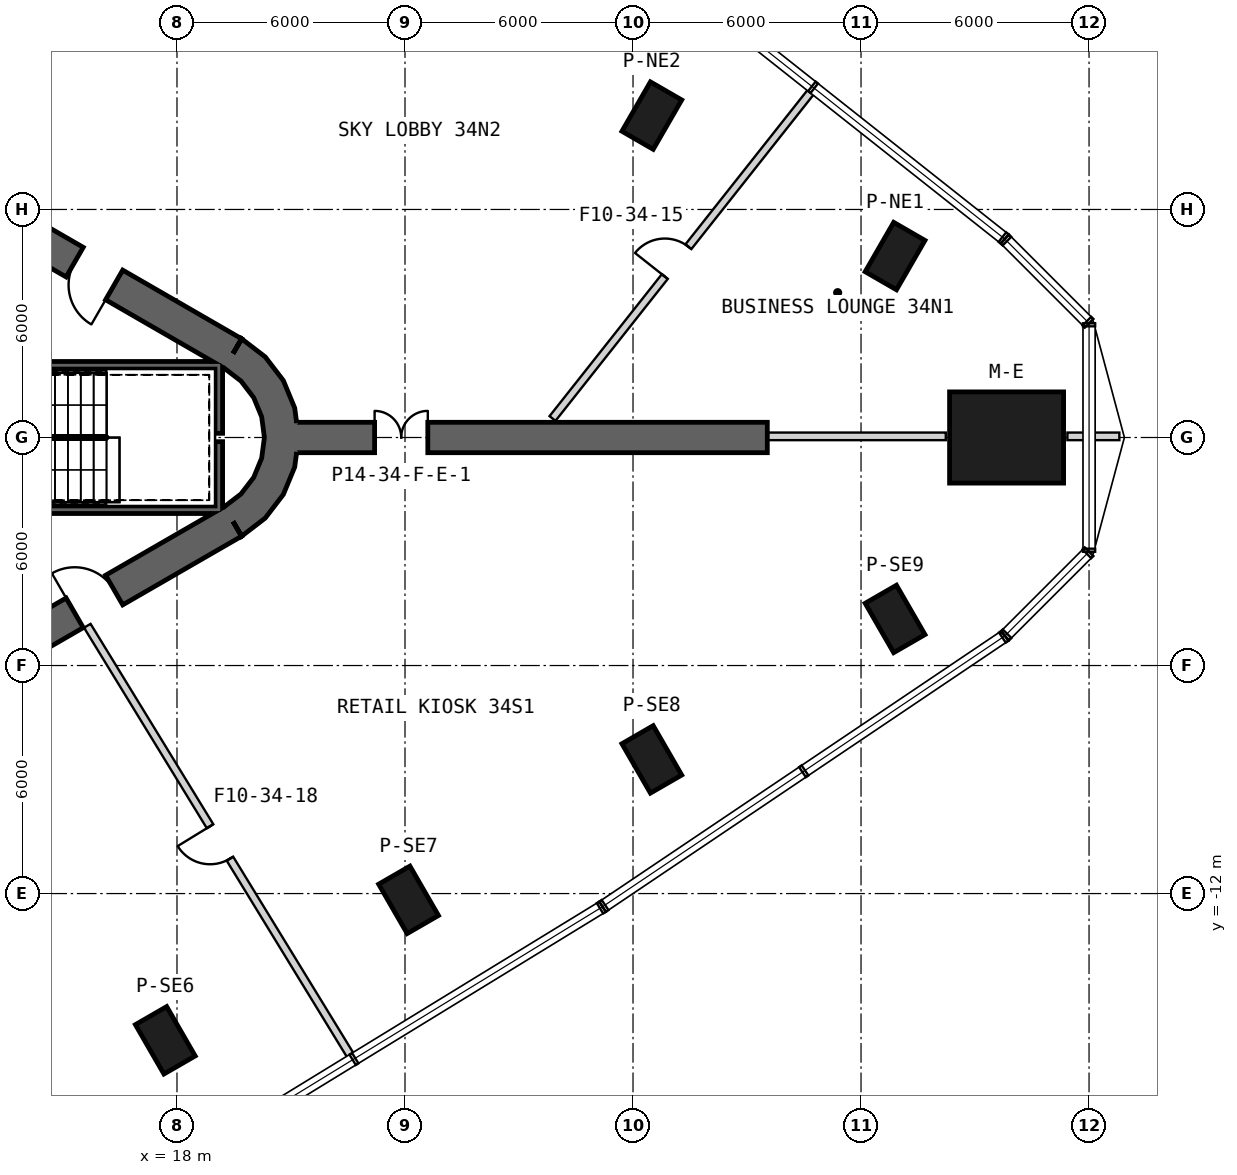
"""IFC4 building model, lengths in metres.
Left out: names, types, materials, properties, quantities, classifications, styles, units other than length and angle.
Written with IfcOpenShell. Run it as: python <this file> out.ifc"""

import sys

from ifc_helpers import new_model, si_unit, direction, frame, frame_2d, origin, origin_2d, place, context, subcontext, project, spatial, polyline, rectangle, outline, extrude, element, fill, save


model = new_model("IFC4")
c1 = context("Model", 3, precision=1e-05, world=origin(), true_north=direction((0.0, 1.0)))
c2 = subcontext(c1, "Body", "Model", "MODEL_VIEW")
j1 = project(units=[si_unit("LENGTHUNIT", "METRE"), si_unit("PLANEANGLEUNIT", "RADIAN")], contexts=[c1])
p1 = place(None, origin())
s1 = spatial("IfcSite", under=j1, at=p1, CompositionType="ELEMENT")
p2 = place(p1, origin())
s2 = spatial("IfcBuilding", under=s1, at=p2, CompositionType="ELEMENT")
p3 = place(p2, frame((0.0, 0.0, 156.2)))
s3 = spatial("IfcBuildingStorey", under=s2, at=p3, CompositionType="ELEMENT", Elevation=156.2)
p4 = place(p3, frame((39.83, 0.0, 0.0), z_axis=(0.0, 0.0, 1.0), x_axis=(1.0, 0.0, 0.0)))
e1 = element("IfcColumn", 1, at=p4, inside=s3, PredefinedType="COLUMN", context=c2, shape_type="SweptSolid", body=[
    extrude(rectangle(XDim=3.0, YDim=2.4, at=origin_2d()), origin(), (0.0, 0.0, 1.0), 7.0),
])
for number, where, z_axis, x_axis in (
    (2, (36.896, 4.774, 0.0), (0.0, 0.0, 1.0), (0.5, 0.866, 0.0)),
    (3, (30.495, 8.47, 0.0), (0.0, 0.0, 1.0), (0.5, 0.866, 0.0)),
    (4, (17.692, -15.861, 0.0), (0.0, 0.0, 1.0), (0.5, -0.866, 0.0)),
    (5, (24.094, -12.166, 0.0), (0.0, 0.0, 1.0), (0.5, -0.866, 0.0)),
    (6, (30.495, -8.47, 0.0), (0.0, 0.0, 1.0), (0.5, -0.866, 0.0)),
    (7, (36.896, -4.774, 0.0), (0.0, 0.0, 1.0), (0.5, -0.866, 0.0)),
):
    element("IfcColumn", number, at=place(p3, frame(where, z_axis=z_axis, x_axis=x_axis)), inside=s3, PredefinedType="COLUMN", context=c2, shape_type="SweptSolid", body=[
        extrude(rectangle(XDim=1.5, YDim=0.95, at=origin_2d()), origin(), (0.0, 0.0, 1.0), 7.0),
    ])
p5 = place(p3, frame((19.475, 2.208, 0.0), z_axis=(0.0, 0.0, 1.0), x_axis=(-0.866028369851, 0.499994862586, 0.0)))
e8 = element("IfcWall", 8, at=p5, inside=s3, PredefinedType="SHEAR", context=c2, shape_type="SweptSolid", body=[
    extrude(rectangle(XDim=31.523, YDim=0.9, at=frame_2d((15.762, 0.0))), origin(), (0.0, 0.0, 1.0), 7.0),
])
p6 = place(p5, frame((7.062, 0.0, 0.0)))
e9 = element("IfcOpeningElement", 9, at=p6, cuts=e8, PredefinedType="OPENING", context=c2, shape_type="SweptSolid", body=[
    extrude(rectangle(XDim=1.2, YDim=2.4, at=frame_2d((0.6, 1.2))), frame((0.0, 0.46, 0.0), z_axis=(0.0, -1.0, 0.0), x_axis=(1.0, 0.0, 0.0)), (0.0, 0.0, 1.0), 0.92),
])
p7 = place(p5, frame((15.162, 0.0, 0.0)))
e10 = element("IfcOpeningElement", 10, at=p7, cuts=e8, PredefinedType="OPENING", context=c2, shape_type="SweptSolid", body=[
    extrude(rectangle(XDim=1.2, YDim=2.4, at=frame_2d((0.6, 1.2))), frame((0.0, 0.46, 0.0), z_axis=(0.0, -1.0, 0.0), x_axis=(1.0, 0.0, 0.0)), (0.0, 0.0, 1.0), 0.92),
])
p8 = place(p5, frame((17.862, 0.0, 0.0)))
e11 = element("IfcOpeningElement", 11, at=p8, cuts=e8, PredefinedType="OPENING", context=c2, shape_type="SweptSolid", body=[
    extrude(rectangle(XDim=1.2, YDim=2.4, at=frame_2d((0.6, 1.2))), frame((0.0, 0.46, 0.0), z_axis=(0.0, -1.0, 0.0), x_axis=(1.0, 0.0, 0.0)), (0.0, 0.0, 1.0), 0.92),
])
p9 = place(p5, frame((20.562, 0.0, 0.0)))
e12 = element("IfcOpeningElement", 12, at=p9, cuts=e8, PredefinedType="OPENING", context=c2, shape_type="SweptSolid", body=[
    extrude(rectangle(XDim=1.2, YDim=2.4, at=frame_2d((0.6, 1.2))), frame((0.0, 0.46, 0.0), z_axis=(0.0, -1.0, 0.0), x_axis=(1.0, 0.0, 0.0)), (0.0, 0.0, 1.0), 0.92),
])
p10 = place(p5, frame((23.262, 0.0, 0.0)))
e13 = element("IfcOpeningElement", 13, at=p10, cuts=e8, PredefinedType="OPENING", context=c2, shape_type="SweptSolid", body=[
    extrude(rectangle(XDim=1.2, YDim=2.4, at=frame_2d((0.6, 1.2))), frame((0.0, 0.46, 0.0), z_axis=(0.0, -1.0, 0.0), x_axis=(1.0, 0.0, 0.0)), (0.0, 0.0, 1.0), 0.92),
])
p11 = place(p5, frame((3.612, 0.0, 0.0)))
e14 = element("IfcOpeningElement", 14, at=p11, cuts=e8, PredefinedType="OPENING", context=c2, shape_type="SweptSolid", body=[
    extrude(rectangle(XDim=1.2, YDim=2.4, at=frame_2d((0.6, 1.2))), frame((0.0, 0.46, 0.0), z_axis=(0.0, -1.0, 0.0), x_axis=(1.0, 0.0, 0.0)), (0.0, 0.0, 1.0), 0.92),
])
p12 = place(p5, frame((26.712, 0.0, 0.0)))
e15 = element("IfcOpeningElement", 15, at=p12, cuts=e8, PredefinedType="OPENING", context=c2, shape_type="SweptSolid", body=[
    extrude(rectangle(XDim=1.2, YDim=2.4, at=frame_2d((0.6, 1.2))), frame((0.0, 0.46, 0.0), z_axis=(0.0, -1.0, 0.0), x_axis=(1.0, 0.0, 0.0)), (0.0, 0.0, 1.0), 0.92),
])
p13 = place(p3, frame((-7.825, -17.97, 0.0), z_axis=(0.0, 0.0, 1.0), x_axis=(0.866028369851, 0.499994862586, 0.0)))
e16 = element("IfcWall", 16, at=p13, inside=s3, PredefinedType="SHEAR", context=c2, shape_type="SweptSolid", body=[
    extrude(rectangle(XDim=31.523, YDim=0.9, at=frame_2d((15.762, 0.0))), origin(), (0.0, 0.0, 1.0), 7.0),
])
p14 = place(p13, frame((7.062, 0.0, 0.0)))
e17 = element("IfcOpeningElement", 17, at=p14, cuts=e16, PredefinedType="OPENING", context=c2, shape_type="SweptSolid", body=[
    extrude(rectangle(XDim=1.2, YDim=2.4, at=frame_2d((0.6, 1.2))), frame((0.0, 0.46, 0.0), z_axis=(0.0, -1.0, 0.0), x_axis=(1.0, 0.0, 0.0)), (0.0, 0.0, 1.0), 0.92),
])
p15 = place(p13, frame((9.762, 0.0, 0.0)))
e18 = element("IfcOpeningElement", 18, at=p15, cuts=e16, PredefinedType="OPENING", context=c2, shape_type="SweptSolid", body=[
    extrude(rectangle(XDim=1.2, YDim=2.4, at=frame_2d((0.6, 1.2))), frame((0.0, 0.46, 0.0), z_axis=(0.0, -1.0, 0.0), x_axis=(1.0, 0.0, 0.0)), (0.0, 0.0, 1.0), 0.92),
])
p16 = place(p13, frame((12.462, 0.0, 0.0)))
e19 = element("IfcOpeningElement", 19, at=p16, cuts=e16, PredefinedType="OPENING", context=c2, shape_type="SweptSolid", body=[
    extrude(rectangle(XDim=1.2, YDim=2.4, at=frame_2d((0.6, 1.2))), frame((0.0, 0.46, 0.0), z_axis=(0.0, -1.0, 0.0), x_axis=(1.0, 0.0, 0.0)), (0.0, 0.0, 1.0), 0.92),
])
p17 = place(p13, frame((15.162, 0.0, 0.0)))
e20 = element("IfcOpeningElement", 20, at=p17, cuts=e16, PredefinedType="OPENING", context=c2, shape_type="SweptSolid", body=[
    extrude(rectangle(XDim=1.2, YDim=2.4, at=frame_2d((0.6, 1.2))), frame((0.0, 0.46, 0.0), z_axis=(0.0, -1.0, 0.0), x_axis=(1.0, 0.0, 0.0)), (0.0, 0.0, 1.0), 0.92),
])
p18 = place(p13, frame((17.862, 0.0, 0.0)))
e21 = element("IfcOpeningElement", 21, at=p18, cuts=e16, PredefinedType="OPENING", context=c2, shape_type="SweptSolid", body=[
    extrude(rectangle(XDim=1.2, YDim=2.4, at=frame_2d((0.6, 1.2))), frame((0.0, 0.46, 0.0), z_axis=(0.0, -1.0, 0.0), x_axis=(1.0, 0.0, 0.0)), (0.0, 0.0, 1.0), 0.92),
])
p19 = place(p13, frame((20.562, 0.0, 0.0)))
e22 = element("IfcOpeningElement", 22, at=p19, cuts=e16, PredefinedType="OPENING", context=c2, shape_type="SweptSolid", body=[
    extrude(rectangle(XDim=1.2, YDim=2.4, at=frame_2d((0.6, 1.2))), frame((0.0, 0.46, 0.0), z_axis=(0.0, -1.0, 0.0), x_axis=(1.0, 0.0, 0.0)), (0.0, 0.0, 1.0), 0.92),
])
p20 = place(p13, frame((26.712, 0.0, 0.0)))
e23 = element("IfcOpeningElement", 23, at=p20, cuts=e16, PredefinedType="OPENING", context=c2, shape_type="SweptSolid", body=[
    extrude(rectangle(XDim=1.2, YDim=2.4, at=frame_2d((0.6, 1.2))), frame((0.0, 0.46, 0.0), z_axis=(0.0, -1.0, 0.0), x_axis=(1.0, 0.0, 0.0)), (0.0, 0.0, 1.0), 0.92),
])
p21 = place(p13, frame((3.612, 0.0, 0.0)))
e24 = element("IfcOpeningElement", 24, at=p21, cuts=e16, PredefinedType="OPENING", context=c2, shape_type="SweptSolid", body=[
    extrude(rectangle(XDim=1.2, YDim=2.4, at=frame_2d((0.6, 1.2))), frame((0.0, 0.46, 0.0), z_axis=(0.0, -1.0, 0.0), x_axis=(1.0, 0.0, 0.0)), (0.0, 0.0, 1.0), 0.92),
])
p22 = place(p3, origin())
e25 = element("IfcWall", 25, at=p22, inside=s3, PredefinedType="SHEAR", context=c2, shape_type="SweptSolid", body=[
    extrude(outline(polyline([(19.7, -2.598), (20.321, -2.121), (20.798, -1.5), (21.098, -0.777), (21.2, 0.0), (21.098, 0.777), (20.798, 1.5), (20.321, 2.121), (19.7, 2.598), (19.25, 1.819), (19.685, 1.485), (20.019, 1.05), (20.229, 0.543), (20.3, 0.0), (20.229, -0.543), (20.019, -1.05), (19.685, -1.485), (19.25, -1.819), (19.7, -2.598)])), origin(), (0.0, 0.0, 1.0), 7.0),
])
p23 = place(p3, frame((21.15, 0.0, 0.0), z_axis=(0.0, 0.0, 1.0), x_axis=(1.0, 0.0, 0.0)))
e26 = element("IfcWall", 26, at=p23, inside=s3, PredefinedType="SHEAR", context=c2, shape_type="SweptSolid", body=[
    extrude(rectangle(XDim=12.384, YDim=0.8, at=frame_2d((6.192, 0.0))), origin(), (0.0, 0.0, 1.0), 7.0),
])
p24 = place(p23, frame((2.05, 0.0, 0.0)))
e27 = element("IfcOpeningElement", 27, at=p24, cuts=e26, PredefinedType="OPENING", context=c2, shape_type="SweptSolid", body=[
    extrude(rectangle(XDim=1.4, YDim=2.4, at=frame_2d((0.7, 1.2))), frame((0.0, 0.41, 0.0), z_axis=(0.0, -1.0, 0.0), x_axis=(1.0, 0.0, 0.0)), (0.0, 0.0, 1.0), 0.82),
])
p25 = place(p3, frame((19.2, 1.9, -0.35), z_axis=(0.0, 0.0, 1.0), x_axis=(-1.0, 0.0, 0.0)))
e28 = element("IfcWall", 28, at=p25, inside=s3, PredefinedType="SHEAR", context=c2, shape_type="SweptSolid", body=[
    extrude(rectangle(XDim=8.1, YDim=0.2, at=frame_2d((4.05, 0.0))), origin(), (0.0, 0.0, 1.0), 7.0),
])
p26 = place(p3, frame((19.1, -2.0, -0.35), z_axis=(0.0, 0.0, 1.0), x_axis=(0.0, 1.0, 0.0)))
e29 = element("IfcWall", 29, at=p26, inside=s3, PredefinedType="SHEAR", context=c2, shape_type="SweptSolid", body=[
    extrude(rectangle(XDim=1.89, YDim=0.2, at=frame_2d((0.945, 0.0))), origin(), (0.0, 0.0, 1.0), 7.0),
])
p27 = place(p3, frame((19.1, 0.11, -0.35), z_axis=(0.0, 0.0, 1.0), x_axis=(0.0, 1.0, 0.0)))
e30 = element("IfcWall", 30, at=p27, inside=s3, PredefinedType="SHEAR", context=c2, shape_type="SweptSolid", body=[
    extrude(rectangle(XDim=1.69, YDim=0.2, at=frame_2d((0.845, 0.0))), origin(), (0.0, 0.0, 1.0), 7.0),
])
p28 = place(p3, frame((11.1, -1.9, -0.35), z_axis=(0.0, 0.0, 1.0), x_axis=(1.0, 0.0, 0.0)))
e31 = element("IfcWall", 31, at=p28, inside=s3, PredefinedType="SHEAR", context=c2, shape_type="SweptSolid", body=[
    extrude(rectangle(XDim=7.9, YDim=0.2, at=frame_2d((3.95, 0.0))), origin(), (0.0, 0.0, 1.0), 7.0),
])
p29 = place(p3, frame((27.882, 0.5, 0.0), z_axis=(0.0, 0.0, 1.0), x_axis=(0.620451383062, 0.784244911527, 0.0)))
e32 = element("IfcWall", 32, at=p29, inside=s3, PredefinedType="PARTITIONING", context=c2, shape_type="SweptSolid", body=[
    extrude(rectangle(XDim=11.088, YDim=0.2, at=frame_2d((5.544, 0.0))), origin(), (0.0, 0.0, 1.0), 5.612),
])
p30 = place(p29, frame((4.762, 0.0, 0.0)))
e33 = element("IfcOpeningElement", 33, at=p30, cuts=e32, PredefinedType="OPENING", context=c2, shape_type="SweptSolid", body=[
    extrude(rectangle(XDim=1.0, YDim=2.1, at=frame_2d((0.5, 1.05))), frame((0.0, 0.11, 0.0), z_axis=(0.0, -1.0, 0.0), x_axis=(1.0, 0.0, 0.0)), (0.0, 0.0, 1.0), 0.22),
])
p31 = place(p3, frame((42.798, 0.03, 0.0), z_axis=(0.0, 0.0, 1.0), x_axis=(-1.0, 0.0, 0.0)))
e34 = element("IfcWall", 34, at=p31, inside=s3, PredefinedType="PARTITIONING", context=c2, shape_type="SweptSolid", body=[
    extrude(rectangle(XDim=1.368, YDim=0.2, at=frame_2d((0.684, 0.0))), origin(), (0.0, 0.0, 1.0), 6.65),
])
p32 = place(p3, frame((38.23, 0.03, 0.0), z_axis=(0.0, 0.0, 1.0), x_axis=(-1.0, 0.0, 0.0)))
e35 = element("IfcWall", 35, at=p32, inside=s3, PredefinedType="PARTITIONING", context=c2, shape_type="SweptSolid", body=[
    extrude(rectangle(XDim=4.697, YDim=0.2, at=frame_2d((2.348, 0.0))), origin(), (0.0, 0.0, 1.0), 6.13),
])
p33 = place(p3, frame((22.631, -16.369, 0.0), z_axis=(0.0, 0.0, 1.0), x_axis=(-0.522292365044, 0.852766489384, 0.0)))
e36 = element("IfcWall", 36, at=p33, inside=s3, PredefinedType="PARTITIONING", context=c2, shape_type="SweptSolid", body=[
    extrude(rectangle(XDim=13.396, YDim=0.2, at=frame_2d((6.698, 0.0))), origin(), (0.0, 0.0, 1.0), 5.612),
])
p34 = place(p33, frame((6.2, 0.0, 0.0)))
e37 = element("IfcOpeningElement", 37, at=p34, cuts=e36, PredefinedType="OPENING", context=c2, shape_type="SweptSolid", body=[
    extrude(rectangle(XDim=1.0, YDim=2.1, at=frame_2d((0.5, 1.05))), frame((0.0, 0.11, 0.0), z_axis=(0.0, -1.0, 0.0), x_axis=(1.0, 0.0, 0.0)), (0.0, 0.0, 1.0), 0.22),
])
p35 = place(p30, origin())
e38 = element("IfcDoor", 38, at=p35, inside=s3, OperationType="SINGLE_SWING_LEFT", PredefinedType="USERDEFINED", context=c2, shape_type="SweptSolid", body=[
    extrude(rectangle(XDim=1.0, YDim=2.1, at=frame_2d((0.5, 1.05))), frame((0.0, 0.025, 0.0), z_axis=(0.0, -1.0, 0.0), x_axis=(1.0, 0.0, 0.0)), (0.0, 0.0, 1.0), 0.05),
])
fill(e33, e38)
p36 = place(p34, origin())
e39 = element("IfcDoor", 39, at=p36, inside=s3, OperationType="SINGLE_SWING_RIGHT", PredefinedType="USERDEFINED", context=c2, shape_type="SweptSolid", body=[
    extrude(rectangle(XDim=1.0, YDim=2.1, at=frame_2d((0.5, 1.05))), frame((0.0, 0.025, 0.0), z_axis=(0.0, -1.0, 0.0), x_axis=(1.0, 0.0, 0.0)), (0.0, 0.0, 1.0), 0.05),
])
fill(e37, e39)
p37 = place(p20, origin())
e40 = element("IfcDoor", 40, at=p37, inside=s3, OperationType="SINGLE_SWING_LEFT", PredefinedType="USERDEFINED", context=c2, shape_type="SweptSolid", body=[
    extrude(rectangle(XDim=1.2, YDim=2.4, at=frame_2d((0.6, 1.2))), frame((0.0, 0.025, 0.0), z_axis=(0.0, -1.0, 0.0), x_axis=(1.0, 0.0, 0.0)), (0.0, 0.0, 1.0), 0.05),
])
fill(e23, e40)
p38 = place(p11, origin())
e41 = element("IfcDoor", 41, at=p38, inside=s3, OperationType="SINGLE_SWING_LEFT", PredefinedType="USERDEFINED", context=c2, shape_type="SweptSolid", body=[
    extrude(rectangle(XDim=1.2, YDim=2.4, at=frame_2d((0.6, 1.2))), frame((0.0, 0.025, 0.0), z_axis=(0.0, -1.0, 0.0), x_axis=(1.0, 0.0, 0.0)), (0.0, 0.0, 1.0), 0.05),
])
fill(e14, e41)
p39 = place(p24, origin())
e42 = element("IfcDoor", 42, at=p39, inside=s3, OperationType="DOUBLE_DOOR_SINGLE_SWING", PredefinedType="NOTDEFINED", context=c2, shape_type="SweptSolid", body=[
    extrude(rectangle(XDim=1.4, YDim=2.4, at=frame_2d((0.7, 1.2))), frame((0.0, 0.025, 0.0), z_axis=(0.0, -1.0, 0.0), x_axis=(1.0, 0.0, 0.0)), (0.0, 0.0, 1.0), 0.05),
])
fill(e27, e42)
save(model, sys.argv[1])
